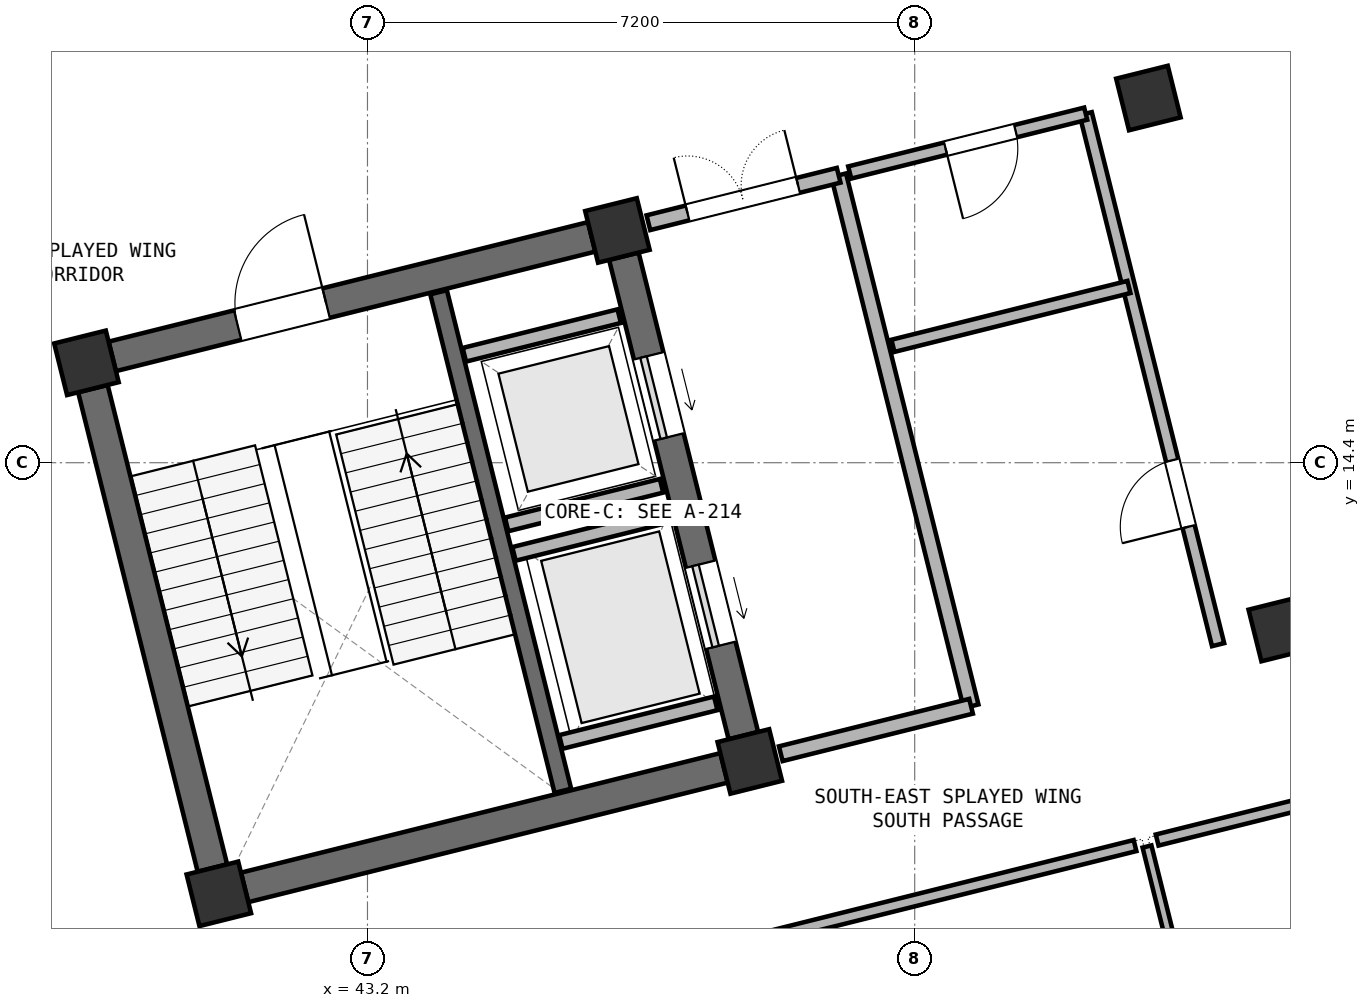
"""IFC4 building model, lengths in metres.
Left out: names, types, materials, properties, quantities, classifications, styles, units other than length and angle.
Written with IfcOpenShell. Run it as: python <this file> out.ifc"""

import sys

from ifc_helpers import new_model, si_unit, direction, frame, frame_2d, origin, origin_2d, place, context, subcontext, project, spatial, rectangle, extrude, element, fill, save


model = new_model("IFC4")
c1 = context("Model", 3, precision=1e-05, world=origin(), true_north=direction((0.0, 1.0)))
c2 = subcontext(c1, "Body", "Model", "MODEL_VIEW")
j1 = project(units=[si_unit("LENGTHUNIT", "METRE"), si_unit("PLANEANGLEUNIT", "RADIAN")], contexts=[c1])
p1 = place(None, origin())
s1 = spatial("IfcSite", under=j1, at=p1, CompositionType="ELEMENT")
p2 = place(p1, origin())
s2 = spatial("IfcBuilding", under=s1, at=p2, CompositionType="ELEMENT")
p3 = place(p2, frame((0.0, 0.0, 14.4)))
s3 = spatial("IfcBuildingStorey", under=s2, at=p3, CompositionType="ELEMENT", Elevation=14.4)
for number, where, z_axis, x_axis in (
    (1, (41.244, 8.728, 0.0), (0.0, 0.0, 1.0), (0.97, 0.242, 0.0)),
    (2, (39.502, 15.714, 0.0), (0.0, 0.0, 1.0), (0.97, 0.242, 0.0)),
    (3, (48.23, 10.47, 0.0), (0.0, 0.0, 1.0), (0.97, 0.242, 0.0)),
    (4, (46.489, 17.456, 0.0), (0.0, 0.0, 1.0), (0.97, 0.242, 0.0)),
    (5, (55.217, 12.212, 0.0), (0.0, 0.0, 1.0), (0.97, 0.242, 0.0)),
    (6, (53.475, 19.198, 0.0), (0.0, 0.0, 1.0), (0.97, 0.242, 0.0)),
):
    element("IfcColumn", number, at=place(p3, frame(where, z_axis=z_axis, x_axis=x_axis)), inside=s3, PredefinedType="COLUMN", context=c2, shape_type="SweptSolid", body=[
        extrude(rectangle(XDim=0.7, YDim=0.7, at=origin_2d()), origin(), (0.0, 0.0, 1.0), 4.2),
    ])
p4 = place(p3, frame((41.584, 8.813, 0.0), z_axis=(0.0, 0.0, 1.0), x_axis=(0.970294759049, 0.241925774902, 0.0)))
e7 = element("IfcWall", 7, at=p4, inside=s3, PredefinedType="SHEAR", context=c2, shape_type="SweptSolid", body=[
    extrude(rectangle(XDim=6.5, YDim=0.4, at=frame_2d((3.25, 0.0))), origin(), (0.0, 0.0, 1.0), 4.2),
])
p5 = place(p3, frame((48.146, 10.809, 0.0), z_axis=(0.0, 0.0, 1.0), x_axis=(-0.241925774902, 0.970294759049, 0.0)))
e8 = element("IfcWall", 8, at=p5, inside=s3, PredefinedType="SHEAR", context=c2, shape_type="SweptSolid", body=[
    extrude(rectangle(XDim=6.5, YDim=0.4, at=frame_2d((3.25, 0.0))), origin(), (0.0, 0.0, 1.0), 4.2),
])
p6 = place(p5, frame((1.225, 0.0, 0.0)))
e9 = element("IfcOpeningElement", 9, at=p6, cuts=e8, PredefinedType="OPENING", context=c2, shape_type="SweptSolid", body=[
    extrude(rectangle(XDim=1.1, YDim=2.2, at=frame_2d((0.55, 1.1))), frame((0.0, 0.21, 0.0), z_axis=(0.0, -1.0, 0.0), x_axis=(1.0, 0.0, 0.0)), (0.0, 0.0, 1.0), 0.42),
])
p7 = place(p5, frame((4.05, 0.0, 0.0)))
e10 = element("IfcOpeningElement", 10, at=p7, cuts=e8, PredefinedType="OPENING", context=c2, shape_type="SweptSolid", body=[
    extrude(rectangle(XDim=1.1, YDim=2.2, at=frame_2d((0.55, 1.1))), frame((0.0, 0.21, 0.0), z_axis=(0.0, -1.0, 0.0), x_axis=(1.0, 0.0, 0.0)), (0.0, 0.0, 1.0), 0.42),
])
p8 = place(p3, frame((46.149, 17.371, 0.0), z_axis=(0.0, 0.0, 1.0), x_axis=(-0.970294759049, -0.241925774902, 0.0)))
e11 = element("IfcWall", 11, at=p8, inside=s3, PredefinedType="SHEAR", context=c2, shape_type="SweptSolid", body=[
    extrude(rectangle(XDim=6.5, YDim=0.4, at=frame_2d((3.25, 0.0))), origin(), (0.0, 0.0, 1.0), 4.2),
])
p9 = place(p8, frame((3.6, 0.0, 0.0)))
e12 = element("IfcOpeningElement", 12, at=p9, cuts=e11, PredefinedType="OPENING", context=c2, shape_type="SweptSolid", body=[
    extrude(rectangle(XDim=1.2, YDim=2.2, at=frame_2d((0.6, 1.1))), frame((0.0, 0.21, 0.0), z_axis=(0.0, -1.0, 0.0), x_axis=(1.0, 0.0, 0.0)), (0.0, 0.0, 1.0), 0.42),
])
p10 = place(p3, frame((39.587, 15.375, 0.0), z_axis=(0.0, 0.0, 1.0), x_axis=(0.241925774902, -0.970294759049, 0.0)))
e13 = element("IfcWall", 13, at=p10, inside=s3, PredefinedType="SHEAR", context=c2, shape_type="SweptSolid", body=[
    extrude(rectangle(XDim=6.5, YDim=0.4, at=frame_2d((3.25, 0.0))), origin(), (0.0, 0.0, 1.0), 4.2),
])
p11 = place(p3, frame((45.771, 10.083, 0.0), z_axis=(0.0, 0.0, 1.0), x_axis=(-0.241898249226, 0.970301621673, 0.0)))
e14 = element("IfcWall", 14, at=p11, inside=s3, PredefinedType="SHEAR", context=c2, shape_type="SweptSolid", body=[
    extrude(rectangle(XDim=6.76, YDim=0.225, at=frame_2d((3.38, 0.0))), origin(), (0.0, 0.0, 1.0), 4.2),
])
for number, where, z_axis, x_axis in (
    (15, (45.745, 10.726, 0.0), (0.0, 0.0, 1.0), (0.97, 0.242, 0.0)),
    (16, (45.128, 13.2, 0.0), (0.0, 0.0, 1.0), (0.97, 0.242, 0.0)),
    (17, (45.031, 13.588, 0.0), (0.0, 0.0, 1.0), (0.97, 0.242, 0.0)),
    (18, (44.475, 15.82, 0.0), (0.0, 0.0, 1.0), (0.97, 0.242, 0.0)),
):
    element("IfcWall", number, at=place(p3, frame(where, z_axis=z_axis, x_axis=x_axis)), inside=s3, PredefinedType="PARTITIONING", context=c2, shape_type="SweptSolid", body=[
        extrude(rectangle(XDim=2.1, YDim=0.185, at=frame_2d((1.05, 0.0))), origin(), (0.0, 0.0, 1.0), 4.2),
    ])
p12 = place(p3, frame((51.141, 11.196, 0.0), z_axis=(0.0, 0.0, 1.0), x_axis=(-0.241937193493, 0.970291911955, 0.0)))
e19 = element("IfcWall", 19, at=p12, inside=s3, PredefinedType="PARTITIONING", context=c2, shape_type="SweptSolid", body=[
    extrude(rectangle(XDim=7.2, YDim=0.2, at=frame_2d((3.6, 0.0))), origin(), (0.0, 0.0, 1.0), 3.08),
])
p13 = place(p3, frame((48.638, 10.572, 0.0), z_axis=(0.0, 0.0, 1.0), x_axis=(0.970309259708, 0.2418676095, 0.0)))
e20 = element("IfcWall", 20, at=p13, inside=s3, PredefinedType="PARTITIONING", context=c2, shape_type="SweptSolid", body=[
    extrude(rectangle(XDim=2.58, YDim=0.2, at=frame_2d((1.29, 0.0))), origin(), (0.0, 0.0, 1.0), 3.08),
])
p14 = place(p3, frame((49.399, 18.182, 0.0), z_axis=(0.0, 0.0, 1.0), x_axis=(-0.970309259708, -0.2418676095, 0.0)))
e21 = element("IfcWall", 21, at=p14, inside=s3, PredefinedType="PARTITIONING", context=c2, shape_type="SweptSolid", body=[
    extrude(rectangle(XDim=2.58, YDim=0.2, at=frame_2d((1.29, 0.0))), origin(), (0.0, 0.0, 1.0), 3.08),
])
p15 = place(p14, frame((0.55, 0.0, 0.0)))
e22 = element("IfcOpeningElement", 22, at=p15, cuts=e21, PredefinedType="OPENING", context=c2, shape_type="SweptSolid", body=[
    extrude(rectangle(XDim=1.5, YDim=2.2, at=frame_2d((0.75, 1.1))), frame((0.0, 0.11, 0.0), z_axis=(0.0, -1.0, 0.0), x_axis=(1.0, 0.0, 0.0)), (0.0, 0.0, 1.0), 0.22),
])
p16 = place(p3, frame((54.392, 12.006, 0.0), z_axis=(0.0, 0.0, 1.0), x_axis=(-0.241937193493, 0.970291911955, 0.0)))
e23 = element("IfcWall", 23, at=p16, inside=s3, PredefinedType="PARTITIONING", context=c2, shape_type="SweptSolid", body=[
    extrude(rectangle(XDim=7.2, YDim=0.165, at=frame_2d((3.6, 0.0))), origin(), (0.0, 0.0, 1.0), 3.08),
])
p17 = place(p16, frame((1.6, 0.0, 0.0)))
e24 = element("IfcOpeningElement", 24, at=p17, cuts=e23, PredefinedType="OPENING", context=c2, shape_type="SweptSolid", body=[
    extrude(rectangle(XDim=0.9, YDim=2.15, at=frame_2d((0.45, 1.075))), frame((0.0, 0.093, 0.0), z_axis=(0.0, -1.0, 0.0), x_axis=(1.0, 0.0, 0.0)), (0.0, 0.0, 1.0), 0.185),
])
p18 = place(p3, frame((52.65, 18.992, 0.0), z_axis=(0.0, 0.0, 1.0), x_axis=(-0.970294894235, -0.241925232711, 0.0)))
e25 = element("IfcWall", 25, at=p18, inside=s3, PredefinedType="PARTITIONING", context=c2, shape_type="SweptSolid", body=[
    extrude(rectangle(XDim=3.2, YDim=0.165, at=frame_2d((1.6, 0.0))), origin(), (0.0, 0.0, 1.0), 3.08),
])
p19 = place(p18, frame((0.95, 0.0, 0.0)))
e26 = element("IfcOpeningElement", 26, at=p19, cuts=e25, PredefinedType="OPENING", context=c2, shape_type="SweptSolid", body=[
    extrude(rectangle(XDim=0.95, YDim=2.15, at=frame_2d((0.475, 1.075))), frame((0.0, 0.093, 0.0), z_axis=(0.0, -1.0, 0.0), x_axis=(1.0, 0.0, 0.0)), (0.0, 0.0, 1.0), 0.185),
])
p20 = place(p3, frame((50.114, 15.938, 0.0), z_axis=(0.0, 0.0, 1.0), x_axis=(0.970294894235, 0.241925232711, 0.0)))
e27 = element("IfcWall", 27, at=p20, inside=s3, PredefinedType="PARTITIONING", context=c2, shape_type="SweptSolid", body=[
    extrude(rectangle(XDim=3.2, YDim=0.165, at=frame_2d((1.6, 0.0))), origin(), (0.0, 0.0, 1.0), 3.08),
])
p21 = place(p3, frame((35.542, 4.936, 0.0), z_axis=(0.0, 0.0, 1.0), x_axis=(0.970295334748, 0.241923465927, 0.0)))
e28 = element("IfcWall", 28, at=p21, inside=s3, PredefinedType="PARTITIONING", context=c2, shape_type="SweptSolid", body=[
    extrude(rectangle(XDim=18.3, YDim=0.15, at=frame_2d((9.15, 0.0))), origin(), (0.0, 0.0, 1.0), 3.08),
])
p22 = place(p21, frame((8.65, 0.0, 0.0)))
e29 = element("IfcOpeningElement", 29, at=p22, cuts=e28, PredefinedType="OPENING", context=c2, shape_type="SweptSolid", body=[
    extrude(rectangle(XDim=1.0, YDim=2.2, at=frame_2d((0.5, 1.1))), frame((0.0, 0.085, 0.0), z_axis=(0.0, -1.0, 0.0), x_axis=(1.0, 0.0, 0.0)), (0.0, 0.0, 1.0), 0.17),
])
p23 = place(p3, frame((53.59, 9.436, 0.0), z_axis=(0.0, 0.0, 1.0), x_axis=(0.970295086625, 0.241924461086, 0.0)))
e30 = element("IfcWall", 30, at=p23, inside=s3, PredefinedType="PARTITIONING", context=c2, shape_type="SweptSolid", body=[
    extrude(rectangle(XDim=14.1, YDim=0.15, at=frame_2d((7.05, 0.0))), origin(), (0.0, 0.0, 1.0), 3.08),
])
p24 = place(p23, frame((6.25, 0.0, 0.0)))
e31 = element("IfcOpeningElement", 31, at=p24, cuts=e30, PredefinedType="OPENING", context=c2, shape_type="SweptSolid", body=[
    extrude(rectangle(XDim=1.6, YDim=2.2, at=frame_2d((0.8, 1.1))), frame((0.0, 0.085, 0.0), z_axis=(0.0, -1.0, 0.0), x_axis=(1.0, 0.0, 0.0)), (0.0, 0.0, 1.0), 0.17),
])
p25 = place(p3, frame((54.586, 4.82, 0.0), z_axis=(0.0, 0.0, 1.0), x_axis=(-0.241945139998, 0.970289930501, 0.0)))
e32 = element("IfcWall", 32, at=p25, inside=s3, PredefinedType="PARTITIONING", context=c2, shape_type="SweptSolid", body=[
    extrude(rectangle(XDim=4.67, YDim=0.12, at=frame_2d((2.335, 0.0))), origin(), (0.0, 0.0, 1.0), 3.08),
])
p26 = place(p6, origin())
e33 = element("IfcDoor", 33, at=p26, inside=s3, OperationType="SLIDING_TO_LEFT", PredefinedType="DOOR", context=c2, shape_type="SweptSolid", body=[
    extrude(rectangle(XDim=1.1, YDim=2.2, at=frame_2d((0.55, 1.1))), frame((0.0, 0.025, 0.0), z_axis=(0.0, -1.0, 0.0), x_axis=(1.0, 0.0, 0.0)), (0.0, 0.0, 1.0), 0.05),
])
fill(e9, e33)
p27 = place(p7, origin())
e34 = element("IfcDoor", 34, at=p27, inside=s3, OperationType="SLIDING_TO_LEFT", PredefinedType="DOOR", context=c2, shape_type="SweptSolid", body=[
    extrude(rectangle(XDim=1.1, YDim=2.2, at=frame_2d((0.55, 1.1))), frame((0.0, 0.025, 0.0), z_axis=(0.0, -1.0, 0.0), x_axis=(1.0, 0.0, 0.0)), (0.0, 0.0, 1.0), 0.05),
])
fill(e10, e34)
p28 = place(p9, frame((1.2, 0.0, 0.0), z_axis=(0.0, 0.0, 1.0), x_axis=(-1.0, 0.0, 0.0)))
e35 = element("IfcDoor", 35, at=p28, inside=s3, OperationType="SINGLE_SWING_RIGHT", PredefinedType="DOOR", context=c2, shape_type="SweptSolid", body=[
    extrude(rectangle(XDim=1.2, YDim=2.2, at=frame_2d((0.6, 1.1))), frame((0.0, 0.025, 0.0), z_axis=(0.0, -1.0, 0.0), x_axis=(1.0, 0.0, 0.0)), (0.0, 0.0, 1.0), 0.05),
])
fill(e12, e35)
p29 = place(p15, frame((1.5, 0.0, 0.0), z_axis=(0.0, 0.0, 1.0), x_axis=(-1.0, 0.0, 0.0)))
e36 = element("IfcDoor", 36, at=p29, inside=s3, OperationType="DOUBLE_DOOR_SINGLE_SWING", PredefinedType="DOOR", context=c2, shape_type="SweptSolid", body=[
    extrude(rectangle(XDim=1.5, YDim=2.2, at=frame_2d((0.75, 1.1))), frame((0.0, 0.025, 0.0), z_axis=(0.0, -1.0, 0.0), x_axis=(1.0, 0.0, 0.0)), (0.0, 0.0, 1.0), 0.05),
])
fill(e22, e36)
p30 = place(p17, origin())
e37 = element("IfcDoor", 37, at=p30, inside=s3, OperationType="SINGLE_SWING_LEFT", PredefinedType="DOOR", context=c2, shape_type="SweptSolid", body=[
    extrude(rectangle(XDim=0.9, YDim=2.15, at=frame_2d((0.45, 1.075))), frame((0.0, 0.025, 0.0), z_axis=(0.0, -1.0, 0.0), x_axis=(1.0, 0.0, 0.0)), (0.0, 0.0, 1.0), 0.05),
])
fill(e24, e37)
p31 = place(p19, origin())
e38 = element("IfcDoor", 38, at=p31, inside=s3, OperationType="SINGLE_SWING_RIGHT", PredefinedType="DOOR", context=c2, shape_type="SweptSolid", body=[
    extrude(rectangle(XDim=0.95, YDim=2.15, at=frame_2d((0.475, 1.075))), frame((0.0, 0.025, 0.0), z_axis=(0.0, -1.0, 0.0), x_axis=(1.0, 0.0, 0.0)), (0.0, 0.0, 1.0), 0.05),
])
fill(e26, e38)
save(model, sys.argv[1])
